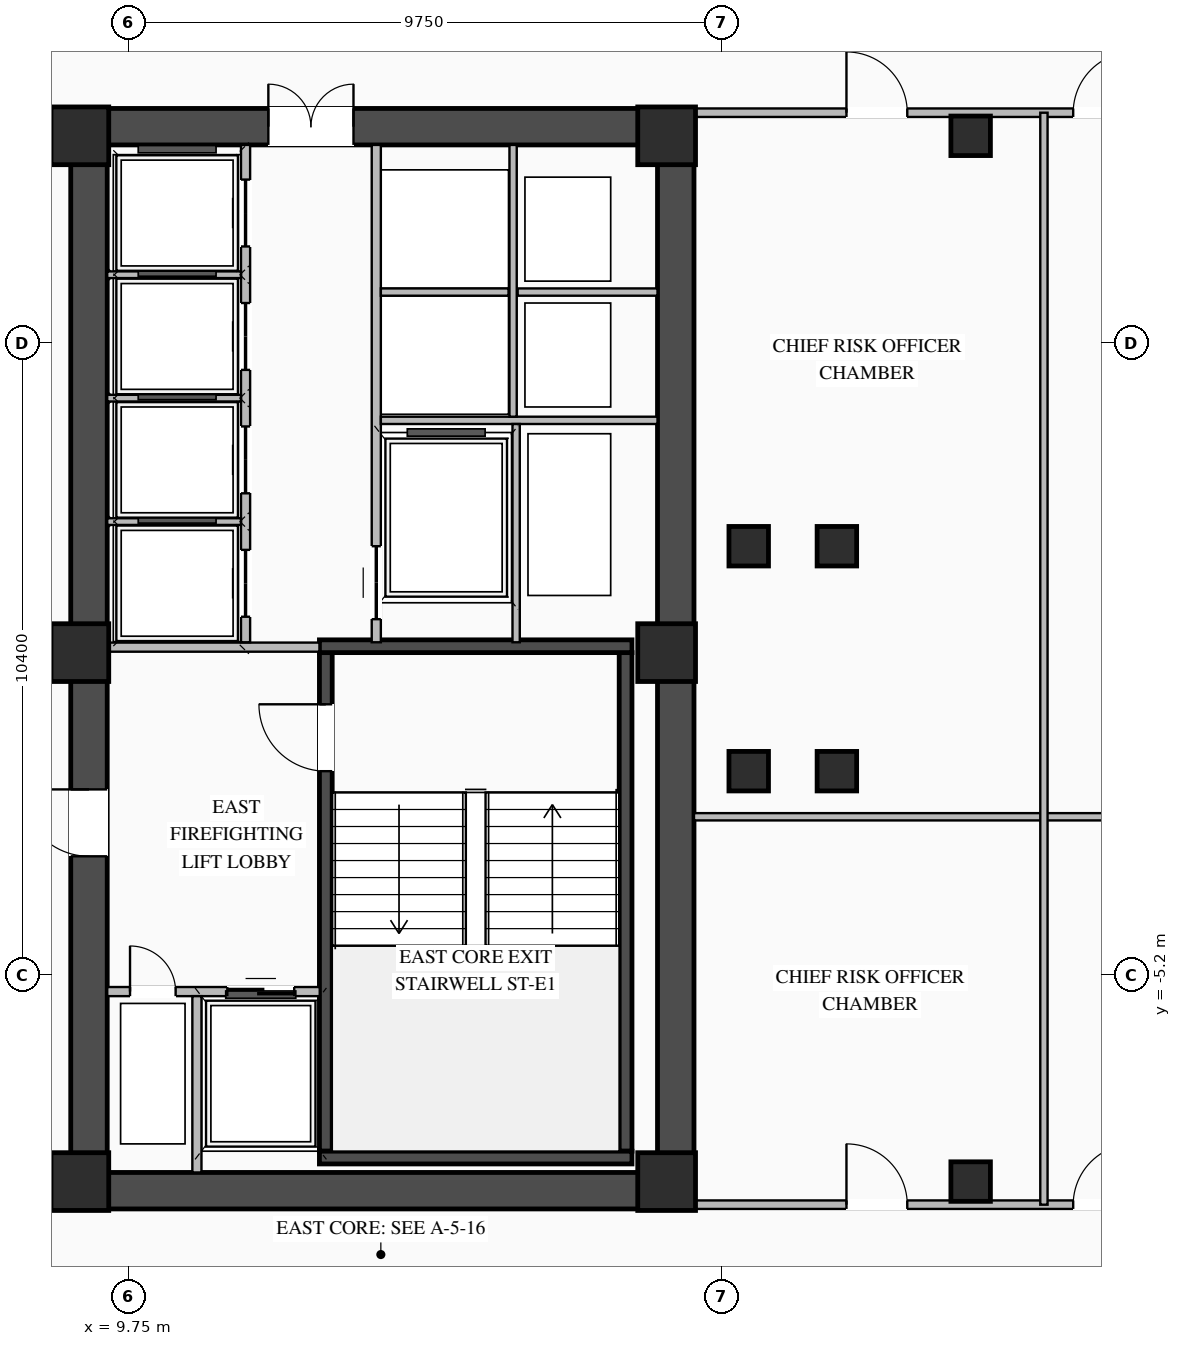
"""IFC4 building model, lengths in metres.
Left out: names, types, materials, properties, quantities, classifications, styles, units other than length and angle.
Written with IfcOpenShell. Run it as: python <this file> out.ifc"""

import sys

from ifc_helpers import new_model, si_unit, direction, frame, frame_2d, origin, origin_2d, place, context, subcontext, project, spatial, rectangle, i_section, extrude, element, fill, save


model = new_model("IFC4")
c1 = context("Model", 3, precision=1e-05, world=origin(), true_north=direction((0.0, 1.0)))
c2 = subcontext(c1, "Body", "Model", "MODEL_VIEW")
j1 = project(units=[si_unit("LENGTHUNIT", "METRE"), si_unit("PLANEANGLEUNIT", "RADIAN")], contexts=[c1])
p1 = place(None, origin())
s1 = spatial("IfcSite", under=j1, at=p1, CompositionType="ELEMENT")
p2 = place(p1, origin())
s2 = spatial("IfcBuilding", under=s1, at=p2, CompositionType="ELEMENT")
p3 = place(p2, frame((0.0, 0.0, 148.45)))
s3 = spatial("IfcBuildingStorey", under=s2, at=p3, CompositionType="ELEMENT", Elevation=148.45)
p4 = place(p3, frame((8.8, -8.75, 0.0), z_axis=(0.0, 0.0, 1.0), x_axis=(1.0, 0.0, 0.0)))
e1 = element("IfcWall", 1, at=p4, inside=s3, PredefinedType="SHEAR", context=c2, shape_type="SweptSolid", body=[
    extrude(rectangle(XDim=10.25, YDim=0.6, at=frame_2d((5.125, 0.0))), origin(), (0.0, 0.0, 1.0), 3.27),
])
p5 = place(p3, frame((8.8, 8.75, 0.0), z_axis=(0.0, 0.0, 1.0), x_axis=(1.0, 0.0, 0.0)))
e2 = element("IfcWall", 2, at=p5, inside=s3, PredefinedType="SHEAR", context=c2, shape_type="SweptSolid", body=[
    extrude(rectangle(XDim=10.25, YDim=0.6, at=frame_2d((5.125, 0.0))), origin(), (0.0, 0.0, 1.0), 3.27),
])
p6 = place(p5, frame((3.25, 0.0, 0.0)))
e3 = element("IfcOpeningElement", 3, at=p6, cuts=e2, PredefinedType="OPENING", context=c2, shape_type="SweptSolid", body=[
    extrude(rectangle(XDim=1.4, YDim=2.05, at=frame_2d((0.7, 1.025))), frame((0.0, 0.31, 0.0), z_axis=(0.0, -1.0, 0.0), x_axis=(1.0, 0.0, 0.0)), (0.0, 0.0, 1.0), 0.62),
])
p7 = place(p3, frame((9.1, -8.45, 0.0), z_axis=(0.0, 0.0, 1.0), x_axis=(0.0, 1.0, 0.0)))
e4 = element("IfcWall", 4, at=p7, inside=s3, PredefinedType="SHEAR", context=c2, shape_type="SweptSolid", body=[
    extrude(rectangle(XDim=16.9, YDim=0.6, at=frame_2d((8.45, 0.0))), origin(), (0.0, 0.0, 1.0), 3.27),
])
p8 = place(p7, frame((5.2, 0.0, 0.0)))
e5 = element("IfcOpeningElement", 5, at=p8, cuts=e4, PredefinedType="OPENING", context=c2, shape_type="SweptSolid", body=[
    extrude(rectangle(XDim=1.1, YDim=2.08, at=frame_2d((0.55, 1.04))), frame((0.0, 0.31, 0.0), z_axis=(0.0, -1.0, 0.0), x_axis=(1.0, 0.0, 0.0)), (0.0, 0.0, 1.0), 0.62),
])
p9 = place(p3, frame((18.75, -8.45, 0.0), z_axis=(0.0, 0.0, 1.0), x_axis=(0.0, 1.0, 0.0)))
e6 = element("IfcWall", 6, at=p9, inside=s3, PredefinedType="SHEAR", context=c2, shape_type="SweptSolid", body=[
    extrude(rectangle(XDim=16.9, YDim=0.6, at=frame_2d((8.45, 0.0))), origin(), (0.0, 0.0, 1.0), 3.27),
])
p10 = place(p3, frame((12.995, -8.1, 0.0), z_axis=(0.0, 0.0, 1.0), x_axis=(0.0, 1.0, 0.0)))
e7 = element("IfcWall", 7, at=p10, inside=s3, PredefinedType="SHEAR", context=c2, shape_type="SweptSolid", body=[
    extrude(rectangle(XDim=8.2, YDim=0.21, at=frame_2d((4.1, 0.0))), origin(), (0.0, 0.0, 1.0), 3.27),
])
p11 = place(p10, frame((6.25, 0.0, 0.0)))
e8 = element("IfcOpeningElement", 8, at=p11, cuts=e7, PredefinedType="OPENING", context=c2, shape_type="SweptSolid", body=[
    extrude(rectangle(XDim=1.1, YDim=2.15, at=frame_2d((0.55, 1.075))), frame((0.0, 0.115, 0.0), z_axis=(0.0, -1.0, 0.0), x_axis=(1.0, 0.0, 0.0)), (0.0, 0.0, 1.0), 0.23),
])
p12 = place(p3, frame((17.925, -8.1, 0.0), z_axis=(0.0, 0.0, 1.0), x_axis=(0.0, 1.0, 0.0)))
e9 = element("IfcWall", 9, at=p12, inside=s3, PredefinedType="SHEAR", context=c2, shape_type="SweptSolid", body=[
    extrude(rectangle(XDim=8.2, YDim=0.21, at=frame_2d((4.1, 0.0))), origin(), (0.0, 0.0, 1.0), 3.27),
])
for number, where, z_axis, x_axis in (
    (10, (12.89, -8.205, 0.0), (0.0, 0.0, 1.0), (1.0, 0.0, 0.0)),
    (11, (18.03, 0.205, 0.0), (0.0, 0.0, 1.0), (-1.0, 0.0, 0.0)),
):
    element("IfcWall", number, at=place(p3, frame(where, z_axis=z_axis, x_axis=x_axis)), inside=s3, PredefinedType="SHEAR", context=c2, shape_type="SweptSolid", body=[
        extrude(rectangle(XDim=5.14, YDim=0.21, at=frame_2d((2.57, 0.0))), origin(), (0.0, 0.0, 1.0), 3.27),
    ])
for number, where, z_axis, x_axis in (
    (12, (8.95, -8.6, 0.0), (0.0, 0.0, 1.0), (1.0, 0.0, 0.0)),
    (13, (8.95, 0.1, 0.0), (0.0, 0.0, 1.0), (1.0, 0.0, 0.0)),
    (14, (8.95, 8.6, 0.0), (0.0, 0.0, 1.0), (1.0, 0.0, 0.0)),
    (15, (18.6, -8.6, 0.0), (0.0, 0.0, 1.0), (1.0, 0.0, 0.0)),
    (16, (18.6, 0.1, 0.0), (0.0, 0.0, 1.0), (1.0, 0.0, 0.0)),
    (17, (18.6, 8.6, 0.0), (0.0, 0.0, 1.0), (1.0, 0.0, 0.0)),
):
    element("IfcColumn", number, at=place(p3, frame(where, z_axis=z_axis, x_axis=x_axis)), inside=s3, PredefinedType="COLUMN", context=c2, shape_type="SweptSolid", body=[
        extrude(rectangle(XDim=0.95, YDim=0.95, at=origin_2d()), origin(), (0.0, 0.0, 1.0), 3.45),
    ])
for number, where, z_axis, x_axis in (
    (18, (19.95, -1.85, 0.0), (0.0, 0.0, 1.0), (1.0, 0.0, 0.0)),
    (19, (19.95, 1.85, 0.0), (0.0, 0.0, 1.0), (1.0, 0.0, 0.0)),
    (20, (21.4, -1.85, 0.0), (0.0, 0.0, 1.0), (1.0, 0.0, 0.0)),
    (21, (21.4, 1.85, 0.0), (0.0, 0.0, 1.0), (1.0, 0.0, 0.0)),
    (22, (23.6, -8.6, 0.0), (0.0, 0.0, 1.0), (1.0, 0.0, 0.0)),
    (23, (23.6, 8.6, 0.0), (0.0, 0.0, 1.0), (1.0, 0.0, 0.0)),
):
    element("IfcColumn", number, at=place(p3, frame(where, z_axis=z_axis, x_axis=x_axis)), inside=s3, PredefinedType="COLUMN", context=c2, shape_type="SweptSolid", body=[
        extrude(i_section(OverallWidth=0.65, OverallDepth=0.65, WebThickness=0.028, FlangeThickness=0.04, at=origin_2d()), origin(), (0.0, 0.0, 1.0), 3.45),
    ])
p13 = place(p3, frame((9.4, -5.475, 0.0), z_axis=(0.0, 0.0, 1.0), x_axis=(1.0, 0.0, 0.0)))
e24 = element("IfcWall", 24, at=p13, inside=s3, PredefinedType="STANDARD", context=c2, shape_type="SweptSolid", body=[
    extrude(rectangle(XDim=3.495, YDim=0.15, at=frame_2d((1.748, 0.0))), origin(), (0.0, 0.0, 1.0), 3.25),
])
p14 = place(p13, frame((1.975, 0.0, 0.0)))
e25 = element("IfcOpeningElement", 25, at=p14, cuts=e24, PredefinedType="OPENING", context=c2, shape_type="SweptSolid", body=[
    extrude(rectangle(XDim=1.1, YDim=2.15, at=frame_2d((0.55, 1.075))), frame((0.0, 0.085, 0.0), z_axis=(0.0, -1.0, 0.0), x_axis=(1.0, 0.0, 0.0)), (0.0, 0.0, 1.0), 0.17),
])
p15 = place(p13, frame((0.375, 0.0, 0.0)))
e26 = element("IfcOpeningElement", 26, at=p15, cuts=e24, PredefinedType="OPENING", context=c2, shape_type="SweptSolid", body=[
    extrude(rectangle(XDim=0.75, YDim=2.05, at=frame_2d((0.375, 1.025))), frame((0.0, 0.085, 0.0), z_axis=(0.0, -1.0, 0.0), x_axis=(1.0, 0.0, 0.0)), (0.0, 0.0, 1.0), 0.17),
])
p16 = place(p3, frame((10.875, -8.45, 0.0), z_axis=(0.0, 0.0, 1.0), x_axis=(0.0, 1.0, 0.0)))
e27 = element("IfcWall", 27, at=p16, inside=s3, PredefinedType="STANDARD", context=c2, shape_type="SweptSolid", body=[
    extrude(rectangle(XDim=2.9, YDim=0.15, at=frame_2d((1.45, 0.0))), origin(), (0.0, 0.0, 1.0), 3.25),
])
p17 = place(p3, frame((9.4, 0.19, 0.0), z_axis=(0.0, 0.0, 1.0), x_axis=(1.0, 0.0, 0.0)))
e28 = element("IfcWall", 28, at=p17, inside=s3, PredefinedType="STANDARD", context=c2, shape_type="SweptSolid", body=[
    extrude(rectangle(XDim=3.49, YDim=0.15, at=frame_2d((1.745, 0.0))), origin(), (0.0, 0.0, 1.0), 2.645),
])
p18 = place(p3, frame((11.675, 0.27, 0.0), z_axis=(0.0, 0.0, 1.0), x_axis=(0.0, 1.0, 0.0)))
e29 = element("IfcWall", 29, at=p18, inside=s3, PredefinedType="STANDARD", context=c2, shape_type="SweptSolid", body=[
    extrude(rectangle(XDim=8.18, YDim=0.15, at=frame_2d((4.09, 0.0))), origin(), (0.0, 0.0, 1.0), 3.25),
])
p19 = place(p18, frame((0.42, 0.0, 0.0)))
e30 = element("IfcOpeningElement", 30, at=p19, cuts=e29, PredefinedType="OPENING", context=c2, shape_type="SweptSolid", body=[
    extrude(rectangle(XDim=1.1, YDim=2.1, at=frame_2d((0.55, 1.05))), frame((0.0, 0.085, 0.0), z_axis=(0.0, -1.0, 0.0), x_axis=(1.0, 0.0, 0.0)), (0.0, 0.0, 1.0), 0.17),
])
p20 = place(p18, frame((2.45, 0.0, 0.0)))
e31 = element("IfcOpeningElement", 31, at=p20, cuts=e29, PredefinedType="OPENING", context=c2, shape_type="SweptSolid", body=[
    extrude(rectangle(XDim=1.1, YDim=2.1, at=frame_2d((0.55, 1.05))), frame((0.0, 0.085, 0.0), z_axis=(0.0, -1.0, 0.0), x_axis=(1.0, 0.0, 0.0)), (0.0, 0.0, 1.0), 0.17),
])
p21 = place(p18, frame((4.48, 0.0, 0.0)))
e32 = element("IfcOpeningElement", 32, at=p21, cuts=e29, PredefinedType="OPENING", context=c2, shape_type="SweptSolid", body=[
    extrude(rectangle(XDim=1.1, YDim=2.1, at=frame_2d((0.55, 1.05))), frame((0.0, 0.085, 0.0), z_axis=(0.0, -1.0, 0.0), x_axis=(1.0, 0.0, 0.0)), (0.0, 0.0, 1.0), 0.17),
])
p22 = place(p18, frame((6.51, 0.0, 0.0)))
e33 = element("IfcOpeningElement", 33, at=p22, cuts=e29, PredefinedType="OPENING", context=c2, shape_type="SweptSolid", body=[
    extrude(rectangle(XDim=1.1, YDim=2.1, at=frame_2d((0.55, 1.05))), frame((0.0, 0.085, 0.0), z_axis=(0.0, -1.0, 0.0), x_axis=(1.0, 0.0, 0.0)), (0.0, 0.0, 1.0), 0.17),
])
for number, where, z_axis, x_axis in (
    (34, (9.4, 2.255, 0.0), (0.0, 0.0, 1.0), (1.0, 0.0, 0.0)),
    (35, (9.4, 4.285, 0.0), (0.0, 0.0, 1.0), (1.0, 0.0, 0.0)),
    (36, (9.4, 6.315, 0.0), (0.0, 0.0, 1.0), (1.0, 0.0, 0.0)),
):
    element("IfcWall", number, at=place(p3, frame(where, z_axis=z_axis, x_axis=x_axis)), inside=s3, PredefinedType="STANDARD", context=c2, shape_type="SweptSolid", body=[
        extrude(rectangle(XDim=2.2, YDim=0.11, at=frame_2d((1.1, 0.0))), origin(), (0.0, 0.0, 1.0), 3.25),
    ])
p23 = place(p3, frame((13.825, 0.27, 0.0), z_axis=(0.0, 0.0, 1.0), x_axis=(0.0, 1.0, 0.0)))
e37 = element("IfcWall", 37, at=p23, inside=s3, PredefinedType="STANDARD", context=c2, shape_type="SweptSolid", body=[
    extrude(rectangle(XDim=8.18, YDim=0.15, at=frame_2d((4.09, 0.0))), origin(), (0.0, 0.0, 1.0), 3.25),
])
p24 = place(p23, frame((0.38, 0.0, 0.0)))
e38 = element("IfcOpeningElement", 38, at=p24, cuts=e37, PredefinedType="OPENING", context=c2, shape_type="SweptSolid", body=[
    extrude(rectangle(XDim=1.2, YDim=2.1, at=frame_2d((0.6, 1.05))), frame((0.0, 0.085, 0.0), z_axis=(0.0, -1.0, 0.0), x_axis=(1.0, 0.0, 0.0)), (0.0, 0.0, 1.0), 0.17),
])
p25 = place(p3, frame((13.9, 3.92, 0.0), z_axis=(0.0, 0.0, 1.0), x_axis=(1.0, 0.0, 0.0)))
e39 = element("IfcWall", 39, at=p25, inside=s3, PredefinedType="STANDARD", context=c2, shape_type="SweptSolid", body=[
    extrude(rectangle(XDim=4.55, YDim=0.12, at=frame_2d((2.275, 0.0))), origin(), (0.0, 0.0, 1.0), 3.25),
])
p26 = place(p3, frame((16.15, 6.03, 0.0), z_axis=(0.0, 0.0, 1.0), x_axis=(1.0, 0.0, 0.0)))
e40 = element("IfcWall", 40, at=p26, inside=s3, PredefinedType="STANDARD", context=c2, shape_type="SweptSolid", body=[
    extrude(rectangle(XDim=2.3, YDim=0.12, at=frame_2d((1.15, 0.0))), origin(), (0.0, 0.0, 1.0), 3.25),
])
p27 = place(p3, frame((16.075, 3.98, 0.0), z_axis=(0.0, 0.0, 1.0), x_axis=(0.0, 1.0, 0.0)))
e41 = element("IfcWall", 41, at=p27, inside=s3, PredefinedType="STANDARD", context=c2, shape_type="SweptSolid", body=[
    extrude(rectangle(XDim=4.47, YDim=0.12, at=frame_2d((2.235, 0.0))), origin(), (0.0, 0.0, 1.0), 3.25),
])
p28 = place(p3, frame((13.9, 6.03, 0.0), z_axis=(0.0, 0.0, 1.0), x_axis=(1.0, 0.0, 0.0)))
e42 = element("IfcWall", 42, at=p28, inside=s3, PredefinedType="STANDARD", context=c2, shape_type="SweptSolid", body=[
    extrude(rectangle(XDim=2.1, YDim=0.12, at=frame_2d((1.05, 0.0))), origin(), (0.0, 0.0, 1.0), 3.25),
])
p29 = place(p3, frame((16.125, 0.27, 0.0), z_axis=(0.0, 0.0, 1.0), x_axis=(0.0, 1.0, 0.0)))
e43 = element("IfcWall", 43, at=p29, inside=s3, PredefinedType="STANDARD", context=c2, shape_type="SweptSolid", body=[
    extrude(rectangle(XDim=3.59, YDim=0.12, at=frame_2d((1.795, 0.0))), origin(), (0.0, 0.0, 1.0), 3.25),
])
p30 = place(p3, frame((19.05, 8.98, 0.0), z_axis=(0.0, 0.0, 1.0), x_axis=(1.0, 0.0, 0.0)))
e44 = element("IfcWall", 44, at=p30, inside=s3, PredefinedType="STANDARD", context=c2, shape_type="SweptSolid", body=[
    extrude(rectangle(XDim=11.77, YDim=0.14, at=frame_2d((5.885, 0.0))), origin(), (0.0, 0.0, 1.0), 3.25),
])
p31 = place(p30, frame((2.508, 0.0, 0.0)))
e45 = element("IfcOpeningElement", 45, at=p31, cuts=e44, PredefinedType="OPENING", context=c2, shape_type="SweptSolid", body=[
    extrude(rectangle(XDim=1.0, YDim=2.08, at=frame_2d((0.5, 1.04))), frame((0.0, 0.08, 0.0), z_axis=(0.0, -1.0, 0.0), x_axis=(1.0, 0.0, 0.0)), (0.0, 0.0, 1.0), 0.16),
])
p32 = place(p30, frame((6.236, 0.0, 0.0)))
e46 = element("IfcOpeningElement", 46, at=p32, cuts=e44, PredefinedType="OPENING", context=c2, shape_type="SweptSolid", body=[
    extrude(rectangle(XDim=1.0, YDim=2.08, at=frame_2d((0.5, 1.04))), frame((0.0, 0.08, 0.0), z_axis=(0.0, -1.0, 0.0), x_axis=(1.0, 0.0, 0.0)), (0.0, 0.0, 1.0), 0.16),
])
p33 = place(p3, frame((19.05, -8.98, 0.0), z_axis=(0.0, 0.0, 1.0), x_axis=(1.0, 0.0, 0.0)))
e47 = element("IfcWall", 47, at=p33, inside=s3, PredefinedType="STANDARD", context=c2, shape_type="SweptSolid", body=[
    extrude(rectangle(XDim=11.77, YDim=0.14, at=frame_2d((5.885, 0.0))), origin(), (0.0, 0.0, 1.0), 3.25),
])
p34 = place(p33, frame((2.508, 0.0, 0.0)))
e48 = element("IfcOpeningElement", 48, at=p34, cuts=e47, PredefinedType="OPENING", context=c2, shape_type="SweptSolid", body=[
    extrude(rectangle(XDim=1.0, YDim=2.08, at=frame_2d((0.5, 1.04))), frame((0.0, 0.08, 0.0), z_axis=(0.0, -1.0, 0.0), x_axis=(1.0, 0.0, 0.0)), (0.0, 0.0, 1.0), 0.16),
])
p35 = place(p33, frame((6.236, 0.0, 0.0)))
e49 = element("IfcOpeningElement", 49, at=p35, cuts=e47, PredefinedType="OPENING", context=c2, shape_type="SweptSolid", body=[
    extrude(rectangle(XDim=1.0, YDim=2.08, at=frame_2d((0.5, 1.04))), frame((0.0, 0.08, 0.0), z_axis=(0.0, -1.0, 0.0), x_axis=(1.0, 0.0, 0.0)), (0.0, 0.0, 1.0), 0.16),
])
p36 = place(p3, frame((19.05, -2.6, 0.0), z_axis=(0.0, 0.0, 1.0), x_axis=(1.0, 0.0, 0.0)))
e50 = element("IfcWall", 50, at=p36, inside=s3, PredefinedType="STANDARD", context=c2, shape_type="SweptSolid", body=[
    extrude(rectangle(XDim=11.77, YDim=0.12, at=frame_2d((5.885, 0.0))), origin(), (0.0, 0.0, 1.0), 3.25),
])
p37 = place(p3, frame((24.805, -8.98, 0.0), z_axis=(0.0, 0.0, 1.0), x_axis=(0.0, 1.0, 0.0)))
e51 = element("IfcWall", 51, at=p37, inside=s3, PredefinedType="STANDARD", context=c2, shape_type="SweptSolid", body=[
    extrude(rectangle(XDim=17.96, YDim=0.12, at=frame_2d((8.98, 0.0))), origin(), (0.0, 0.0, 1.0), 3.25),
])
p38 = place(p11, origin())
e52 = element("IfcDoor", 52, at=p38, inside=s3, OperationType="SINGLE_SWING_RIGHT", PredefinedType="DOOR", context=c2, shape_type="SweptSolid", body=[
    extrude(rectangle(XDim=1.1, YDim=2.15, at=frame_2d((0.55, 1.075))), frame((0.0, 0.025, 0.0), z_axis=(0.0, -1.0, 0.0), x_axis=(1.0, 0.0, 0.0)), (0.0, 0.0, 1.0), 0.05),
])
fill(e8, e52)
p39 = place(p14, origin())
e53 = element("IfcDoor", 53, at=p39, inside=s3, OperationType="DOUBLE_DOOR_SLIDING", PredefinedType="DOOR", context=c2, shape_type="SweptSolid", body=[
    extrude(rectangle(XDim=1.1, YDim=2.15, at=frame_2d((0.55, 1.075))), frame((0.0, 0.025, 0.0), z_axis=(0.0, -1.0, 0.0), x_axis=(1.0, 0.0, 0.0)), (0.0, 0.0, 1.0), 0.05),
])
fill(e25, e53)
p40 = place(p15, origin())
e54 = element("IfcDoor", 54, at=p40, inside=s3, OperationType="SINGLE_SWING_LEFT", PredefinedType="DOOR", context=c2, shape_type="SweptSolid", body=[
    extrude(rectangle(XDim=0.75, YDim=2.05, at=frame_2d((0.375, 1.025))), frame((0.0, 0.025, 0.0), z_axis=(0.0, -1.0, 0.0), x_axis=(1.0, 0.0, 0.0)), (0.0, 0.0, 1.0), 0.05),
])
fill(e26, e54)
p41 = place(p8, origin())
e55 = element("IfcDoor", 55, at=p41, inside=s3, OperationType="SINGLE_SWING_RIGHT", PredefinedType="DOOR", context=c2, shape_type="SweptSolid", body=[
    extrude(rectangle(XDim=1.1, YDim=2.08, at=frame_2d((0.55, 1.04))), frame((0.0, -0.205, 0.0), z_axis=(0.0, -1.0, 0.0), x_axis=(1.0, 0.0, 0.0)), (0.0, 0.0, 1.0), 0.05),
])
fill(e5, e55)
p42 = place(p6, origin())
e56 = element("IfcDoor", 56, at=p42, inside=s3, OperationType="DOUBLE_DOOR_SINGLE_SWING", PredefinedType="DOOR", context=c2, shape_type="SweptSolid", body=[
    extrude(rectangle(XDim=1.4, YDim=2.05, at=frame_2d((0.7, 1.025))), frame((0.0, 0.245, 0.0), z_axis=(0.0, -1.0, 0.0), x_axis=(1.0, 0.0, 0.0)), (0.0, 0.0, 1.0), 0.05),
])
fill(e3, e56)
p43 = place(p19, origin())
e57 = element("IfcDoor", 57, at=p43, inside=s3, OperationType="DOUBLE_DOOR_SLIDING", PredefinedType="DOOR", context=c2, shape_type="SweptSolid", body=[
    extrude(rectangle(XDim=1.1, YDim=2.1, at=frame_2d((0.55, 1.05))), frame((0.0, 0.025, 0.0), z_axis=(0.0, -1.0, 0.0), x_axis=(1.0, 0.0, 0.0)), (0.0, 0.0, 1.0), 0.05),
])
fill(e30, e57)
p44 = place(p20, origin())
e58 = element("IfcDoor", 58, at=p44, inside=s3, OperationType="DOUBLE_DOOR_SLIDING", PredefinedType="DOOR", context=c2, shape_type="SweptSolid", body=[
    extrude(rectangle(XDim=1.1, YDim=2.1, at=frame_2d((0.55, 1.05))), frame((0.0, 0.025, 0.0), z_axis=(0.0, -1.0, 0.0), x_axis=(1.0, 0.0, 0.0)), (0.0, 0.0, 1.0), 0.05),
])
fill(e31, e58)
p45 = place(p21, origin())
e59 = element("IfcDoor", 59, at=p45, inside=s3, OperationType="DOUBLE_DOOR_SLIDING", PredefinedType="DOOR", context=c2, shape_type="SweptSolid", body=[
    extrude(rectangle(XDim=1.1, YDim=2.1, at=frame_2d((0.55, 1.05))), frame((0.0, 0.025, 0.0), z_axis=(0.0, -1.0, 0.0), x_axis=(1.0, 0.0, 0.0)), (0.0, 0.0, 1.0), 0.05),
])
fill(e32, e59)
p46 = place(p22, origin())
e60 = element("IfcDoor", 60, at=p46, inside=s3, OperationType="DOUBLE_DOOR_SLIDING", PredefinedType="DOOR", context=c2, shape_type="SweptSolid", body=[
    extrude(rectangle(XDim=1.1, YDim=2.1, at=frame_2d((0.55, 1.05))), frame((0.0, 0.025, 0.0), z_axis=(0.0, -1.0, 0.0), x_axis=(1.0, 0.0, 0.0)), (0.0, 0.0, 1.0), 0.05),
])
fill(e33, e60)
p47 = place(p24, origin())
e61 = element("IfcDoor", 61, at=p47, inside=s3, OperationType="DOUBLE_DOOR_SLIDING", PredefinedType="DOOR", context=c2, shape_type="SweptSolid", body=[
    extrude(rectangle(XDim=1.2, YDim=2.1, at=frame_2d((0.6, 1.05))), frame((0.0, 0.025, 0.0), z_axis=(0.0, -1.0, 0.0), x_axis=(1.0, 0.0, 0.0)), (0.0, 0.0, 1.0), 0.05),
])
fill(e38, e61)
p48 = place(p31, origin())
e62 = element("IfcDoor", 62, at=p48, inside=s3, OperationType="SINGLE_SWING_LEFT", PredefinedType="DOOR", context=c2, shape_type="SweptSolid", body=[
    extrude(rectangle(XDim=1.0, YDim=2.08, at=frame_2d((0.5, 1.04))), frame((0.0, 0.025, 0.0), z_axis=(0.0, -1.0, 0.0), x_axis=(1.0, 0.0, 0.0)), (0.0, 0.0, 1.0), 0.05),
])
fill(e45, e62)
p49 = place(p32, origin())
e63 = element("IfcDoor", 63, at=p49, inside=s3, OperationType="SINGLE_SWING_RIGHT", PredefinedType="DOOR", context=c2, shape_type="SweptSolid", body=[
    extrude(rectangle(XDim=1.0, YDim=2.08, at=frame_2d((0.5, 1.04))), frame((0.0, 0.025, 0.0), z_axis=(0.0, -1.0, 0.0), x_axis=(1.0, 0.0, 0.0)), (0.0, 0.0, 1.0), 0.05),
])
fill(e46, e63)
p50 = place(p34, origin())
e64 = element("IfcDoor", 64, at=p50, inside=s3, OperationType="SINGLE_SWING_LEFT", PredefinedType="DOOR", context=c2, shape_type="SweptSolid", body=[
    extrude(rectangle(XDim=1.0, YDim=2.08, at=frame_2d((0.5, 1.04))), frame((0.0, 0.025, 0.0), z_axis=(0.0, -1.0, 0.0), x_axis=(1.0, 0.0, 0.0)), (0.0, 0.0, 1.0), 0.05),
])
fill(e48, e64)
p51 = place(p35, origin())
e65 = element("IfcDoor", 65, at=p51, inside=s3, OperationType="SINGLE_SWING_RIGHT", PredefinedType="DOOR", context=c2, shape_type="SweptSolid", body=[
    extrude(rectangle(XDim=1.0, YDim=2.08, at=frame_2d((0.5, 1.04))), frame((0.0, 0.025, 0.0), z_axis=(0.0, -1.0, 0.0), x_axis=(1.0, 0.0, 0.0)), (0.0, 0.0, 1.0), 0.05),
])
fill(e49, e65)
save(model, sys.argv[1])
